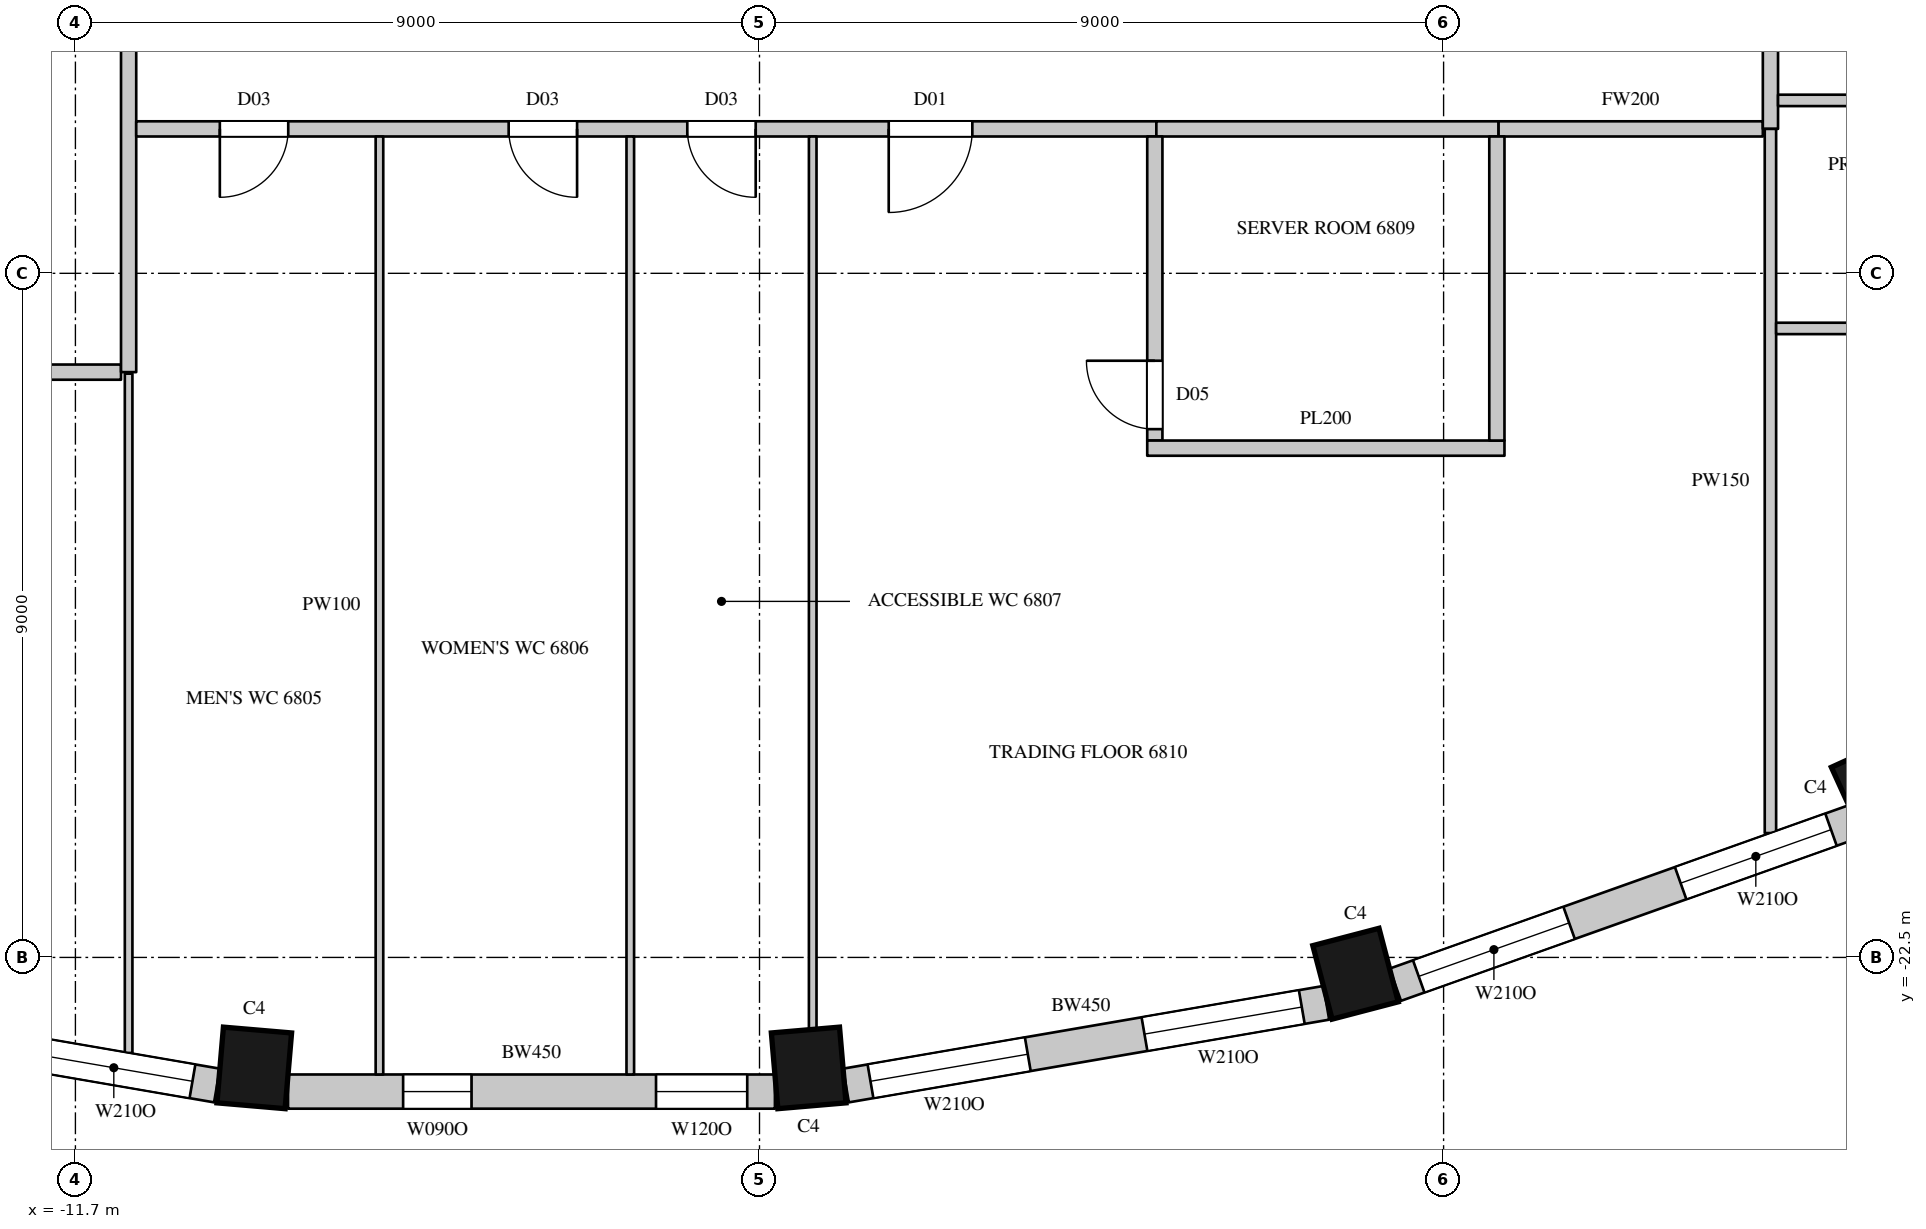
"""IFC4 building model, lengths in metres.
Left out: names, types, materials, properties, quantities, classifications, styles, units other than length and angle.
Written with IfcOpenShell. Run it as: python <this file> out.ifc"""

import sys

from ifc_helpers import new_model, si_unit, direction, frame, frame_2d, origin, origin_2d, place, context, subcontext, project, spatial, rectangle, extrude, element, fill, save


model = new_model("IFC4")
c1 = context("Model", 3, precision=1e-05, world=origin(), true_north=direction((0.0, 1.0)))
c2 = subcontext(c1, "Body", "Model", "MODEL_VIEW")
j1 = project(units=[si_unit("LENGTHUNIT", "METRE"), si_unit("PLANEANGLEUNIT", "RADIAN")], contexts=[c1])
p1 = place(None, origin())
s1 = spatial("IfcSite", under=j1, at=p1, CompositionType="ELEMENT")
p2 = place(p1, origin())
s2 = spatial("IfcBuilding", under=s1, at=p2, CompositionType="ELEMENT")
p3 = place(p2, frame((0.0, 0.0, 300.8)))
s3 = spatial("IfcBuildingStorey", under=s2, at=p3, CompositionType="ELEMENT", Elevation=300.8)
for number, where, z_axis, x_axis in (
    (1, (-9.347, -23.954, 0.0), (0.0, 0.0, 1.0), (0.996, -0.085, 0.0)),
    (2, (-2.053, -23.954, 0.0), (0.0, 0.0, 1.0), (0.996, 0.085, 0.0)),
    (3, (5.142, -22.715, 0.0), (0.0, 0.0, 1.0), (0.967, 0.253, 0.0)),
    (4, (12.019, -20.267, 0.0), (0.0, 0.0, 1.0), (0.91, 0.415, 0.0)),
):
    element("IfcColumn", number, at=place(p3, frame(where, z_axis=z_axis, x_axis=x_axis)), inside=s3, PredefinedType="COLUMN", context=c2, shape_type="SweptSolid", body=[
        extrude(rectangle(XDim=0.9, YDim=1.0, at=origin_2d()), origin(), (0.0, 0.0, 1.0), 4.1),
    ])
p4 = place(p3, frame((-16.157, -23.097, 0.0), z_axis=(0.0, 0.0, 1.0), x_axis=(0.985502073964, -0.169663379113, 0.0)))
e5 = element("IfcWall", 5, at=p4, inside=s3, PredefinedType="SOLIDWALL", context=c2, shape_type="SweptSolid", body=[
    extrude(rectangle(XDim=6.412, YDim=0.45, at=frame_2d((3.206, 0.0))), origin(), (0.0, 0.0, 1.0), 3.8),
])
p5 = place(p4, frame((0.327, 0.0, 1.05)))
e6 = element("IfcOpeningElement", 6, at=p5, cuts=e5, PredefinedType="OPENING", context=c2, shape_type="SweptSolid", body=[
    extrude(rectangle(XDim=2.1, YDim=2.4, at=frame_2d((1.05, 1.2))), frame((0.0, 0.235, 0.0), z_axis=(0.0, -1.0, 0.0), x_axis=(1.0, 0.0, 0.0)), (0.0, 0.0, 1.0), 0.47),
])
p6 = place(p4, frame((3.985, 0.0, 1.05)))
e7 = element("IfcOpeningElement", 7, at=p6, cuts=e5, PredefinedType="OPENING", context=c2, shape_type="SweptSolid", body=[
    extrude(rectangle(XDim=2.1, YDim=2.4, at=frame_2d((1.05, 1.2))), frame((0.0, 0.235, 0.0), z_axis=(0.0, -1.0, 0.0), x_axis=(1.0, 0.0, 0.0)), (0.0, 0.0, 1.0), 0.47),
])
p7 = place(p3, frame((-8.903, -24.265, 0.0), z_axis=(0.0, 0.0, 1.0), x_axis=(1.0, 0.0, 0.0)))
e8 = element("IfcWall", 8, at=p7, inside=s3, PredefinedType="SOLIDWALL", context=c2, shape_type="SweptSolid", body=[
    extrude(rectangle(XDim=6.406, YDim=0.45, at=frame_2d((3.203, 0.0))), origin(), (0.0, 0.0, 1.0), 3.8),
])
p8 = place(p7, frame((1.514, 0.0, 1.05)))
e9 = element("IfcOpeningElement", 9, at=p8, cuts=e8, PredefinedType="OPENING", context=c2, shape_type="SweptSolid", body=[
    extrude(rectangle(XDim=0.9, YDim=2.4, at=frame_2d((0.45, 1.2))), frame((0.0, 0.235, 0.0), z_axis=(0.0, -1.0, 0.0), x_axis=(1.0, 0.0, 0.0)), (0.0, 0.0, 1.0), 0.47),
])
p9 = place(p7, frame((4.841, 0.0, 1.05)))
e10 = element("IfcOpeningElement", 10, at=p9, cuts=e8, PredefinedType="OPENING", context=c2, shape_type="SweptSolid", body=[
    extrude(rectangle(XDim=1.2, YDim=2.4, at=frame_2d((0.6, 1.2))), frame((0.0, 0.235, 0.0), z_axis=(0.0, -1.0, 0.0), x_axis=(1.0, 0.0, 0.0)), (0.0, 0.0, 1.0), 0.47),
])
p10 = place(p3, frame((-1.562, -24.185, 0.0), z_axis=(0.0, 0.0, 1.0), x_axis=(0.985502073964, 0.169663379113, 0.0)))
e11 = element("IfcWall", 11, at=p10, inside=s3, PredefinedType="SOLIDWALL", context=c2, shape_type="SweptSolid", body=[
    extrude(rectangle(XDim=6.412, YDim=0.45, at=frame_2d((3.206, 0.0))), origin(), (0.0, 0.0, 1.0), 3.8),
])
p11 = place(p10, frame((0.327, 0.0, 1.05)))
e12 = element("IfcOpeningElement", 12, at=p11, cuts=e11, PredefinedType="OPENING", context=c2, shape_type="SweptSolid", body=[
    extrude(rectangle(XDim=2.1, YDim=2.4, at=frame_2d((1.05, 1.2))), frame((0.0, 0.235, 0.0), z_axis=(0.0, -1.0, 0.0), x_axis=(1.0, 0.0, 0.0)), (0.0, 0.0, 1.0), 0.47),
])
p12 = place(p10, frame((3.985, 0.0, 1.05)))
e13 = element("IfcOpeningElement", 13, at=p12, cuts=e11, PredefinedType="OPENING", context=c2, shape_type="SweptSolid", body=[
    extrude(rectangle(XDim=2.1, YDim=2.4, at=frame_2d((1.05, 1.2))), frame((0.0, 0.235, 0.0), z_axis=(0.0, -1.0, 0.0), x_axis=(1.0, 0.0, 0.0)), (0.0, 0.0, 1.0), 0.47),
])
p13 = place(p3, frame((5.665, -22.859, 0.0), z_axis=(0.0, 0.0, 1.0), x_axis=(0.942108340262, 0.335308626803, 0.0)))
e14 = element("IfcWall", 14, at=p13, inside=s3, PredefinedType="SOLIDWALL", context=c2, shape_type="SweptSolid", body=[
    extrude(rectangle(XDim=6.412, YDim=0.45, at=frame_2d((3.206, 0.0))), origin(), (0.0, 0.0, 1.0), 3.8),
])
p14 = place(p13, frame((0.327, 0.0, 1.05)))
e15 = element("IfcOpeningElement", 15, at=p14, cuts=e14, PredefinedType="OPENING", context=c2, shape_type="SweptSolid", body=[
    extrude(rectangle(XDim=2.1, YDim=2.4, at=frame_2d((1.05, 1.2))), frame((0.0, 0.235, 0.0), z_axis=(0.0, -1.0, 0.0), x_axis=(1.0, 0.0, 0.0)), (0.0, 0.0, 1.0), 0.47),
])
p15 = place(p13, frame((3.985, 0.0, 1.05)))
e16 = element("IfcOpeningElement", 16, at=p15, cuts=e14, PredefinedType="OPENING", context=c2, shape_type="SweptSolid", body=[
    extrude(rectangle(XDim=2.1, YDim=2.4, at=frame_2d((1.05, 1.2))), frame((0.0, 0.235, 0.0), z_axis=(0.0, -1.0, 0.0), x_axis=(1.0, 0.0, 0.0)), (0.0, 0.0, 1.0), 0.47),
])
p16 = place(p3, frame((-13.97, -14.8, 0.0), z_axis=(0.0, 0.0, 1.0), x_axis=(1.0, 0.0, 0.0)))
e17 = element("IfcWall", 17, at=p16, inside=s3, PredefinedType="PARTITIONING", context=c2, shape_type="SweptSolid", body=[
    extrude(rectangle(XDim=2.87, YDim=0.2, at=frame_2d((1.435, 0.0))), origin(), (0.0, 0.0, 1.0), 3.8),
])
p17 = place(p3, frame((-11.0, -14.8, 0.0), z_axis=(0.0, 0.0, 1.0), x_axis=(0.0, 1.0, 0.0)))
e18 = element("IfcWall", 18, at=p17, inside=s3, PredefinedType="PARTITIONING", context=c2, shape_type="SweptSolid", body=[
    extrude(rectangle(XDim=29.5, YDim=0.2, at=frame_2d((14.75, 0.0))), origin(), (0.0, 0.0, 1.0), 3.8),
])
p18 = place(p17, frame((10.5, 0.0, 0.0)))
e19 = element("IfcOpeningElement", 19, at=p18, cuts=e18, PredefinedType="OPENING", context=c2, shape_type="SweptSolid", body=[
    extrude(rectangle(XDim=1.5, YDim=2.4, at=frame_2d((0.75, 1.2))), frame((0.0, 0.11, 0.0), z_axis=(0.0, -1.0, 0.0), x_axis=(1.0, 0.0, 0.0)), (0.0, 0.0, 1.0), 0.22),
])
p19 = place(p3, frame((-10.9, -11.6, 0.0), z_axis=(0.0, 0.0, 1.0), x_axis=(1.0, 0.0, 0.0)))
e20 = element("IfcWall", 20, at=p19, inside=s3, PredefinedType="PARTITIONING", context=c2, shape_type="SweptSolid", body=[
    extrude(rectangle(XDim=13.421, YDim=0.2, at=frame_2d((6.71, 0.0))), origin(), (0.0, 0.0, 1.0), 3.8),
])
p20 = place(p19, frame((1.1, 0.0, 0.0)))
e21 = element("IfcOpeningElement", 21, at=p20, cuts=e20, PredefinedType="OPENING", context=c2, shape_type="SweptSolid", body=[
    extrude(rectangle(XDim=0.9, YDim=2.2, at=frame_2d((0.45, 1.1))), frame((0.0, 0.11, 0.0), z_axis=(0.0, -1.0, 0.0), x_axis=(1.0, 0.0, 0.0)), (0.0, 0.0, 1.0), 0.22),
])
p21 = place(p19, frame((4.9, 0.0, 0.0)))
e22 = element("IfcOpeningElement", 22, at=p21, cuts=e20, PredefinedType="OPENING", context=c2, shape_type="SweptSolid", body=[
    extrude(rectangle(XDim=0.9, YDim=2.2, at=frame_2d((0.45, 1.1))), frame((0.0, 0.11, 0.0), z_axis=(0.0, -1.0, 0.0), x_axis=(1.0, 0.0, 0.0)), (0.0, 0.0, 1.0), 0.22),
])
p22 = place(p19, frame((7.25, 0.0, 0.0)))
e23 = element("IfcOpeningElement", 23, at=p22, cuts=e20, PredefinedType="OPENING", context=c2, shape_type="SweptSolid", body=[
    extrude(rectangle(XDim=0.9, YDim=2.2, at=frame_2d((0.45, 1.1))), frame((0.0, 0.11, 0.0), z_axis=(0.0, -1.0, 0.0), x_axis=(1.0, 0.0, 0.0)), (0.0, 0.0, 1.0), 0.22),
])
p23 = place(p19, frame((9.9, 0.0, 0.0)))
e24 = element("IfcOpeningElement", 24, at=p23, cuts=e20, PredefinedType="OPENING", context=c2, shape_type="SweptSolid", body=[
    extrude(rectangle(XDim=1.1, YDim=2.4, at=frame_2d((0.55, 1.2))), frame((0.0, 0.11, 0.0), z_axis=(0.0, -1.0, 0.0), x_axis=(1.0, 0.0, 0.0)), (0.0, 0.0, 1.0), 0.22),
])
p24 = place(p3, frame((7.021, -11.6, 0.0), z_axis=(0.0, 0.0, 1.0), x_axis=(1.0, 0.0, 0.0)))
e25 = element("IfcWall", 25, at=p24, inside=s3, PredefinedType="PARTITIONING", context=c2, shape_type="SweptSolid", body=[
    extrude(rectangle(XDim=3.479, YDim=0.2, at=frame_2d((1.74, 0.0))), origin(), (0.0, 0.0, 1.0), 3.8),
])
p25 = place(p3, frame((10.6, -11.6, 0.0), z_axis=(0.0, 0.0, 1.0), x_axis=(0.0, 1.0, 0.0)))
e26 = element("IfcWall", 26, at=p25, inside=s3, PredefinedType="PARTITIONING", context=c2, shape_type="SweptSolid", body=[
    extrude(rectangle(XDim=23.7, YDim=0.2, at=frame_2d((11.85, 0.0))), origin(), (0.0, 0.0, 1.0), 3.8),
])
p26 = place(p25, frame((9.45, 0.0, 0.0)))
e27 = element("IfcOpeningElement", 27, at=p26, cuts=e26, PredefinedType="OPENING", context=c2, shape_type="SweptSolid", body=[
    extrude(rectangle(XDim=1.5, YDim=2.4, at=frame_2d((0.75, 1.2))), frame((0.0, 0.11, 0.0), z_axis=(0.0, -1.0, 0.0), x_axis=(1.0, 0.0, 0.0)), (0.0, 0.0, 1.0), 0.22),
])
p27 = place(p25, frame((19.45, 0.0, 0.0)))
e28 = element("IfcOpeningElement", 28, at=p27, cuts=e26, PredefinedType="OPENING", context=c2, shape_type="SweptSolid", body=[
    extrude(rectangle(XDim=1.1, YDim=2.4, at=frame_2d((0.55, 1.2))), frame((0.0, 0.11, 0.0), z_axis=(0.0, -1.0, 0.0), x_axis=(1.0, 0.0, 0.0)), (0.0, 0.0, 1.0), 0.22),
])
p28 = place(p25, frame((4.6, 0.0, 0.0)))
e29 = element("IfcOpeningElement", 29, at=p28, cuts=e26, PredefinedType="OPENING", context=c2, shape_type="SweptSolid", body=[
    extrude(rectangle(XDim=1.1, YDim=2.4, at=frame_2d((0.55, 1.2))), frame((0.0, 0.11, 0.0), z_axis=(0.0, -1.0, 0.0), x_axis=(1.0, 0.0, 0.0)), (0.0, 0.0, 1.0), 0.22),
])
p29 = place(p3, frame((10.6, -20.864, 0.0), z_axis=(0.0, 0.0, 1.0), x_axis=(0.0, 1.0, 0.0)))
e30 = element("IfcWall", 30, at=p29, inside=s3, PredefinedType="PARTITIONING", context=c2, shape_type="SweptSolid", body=[
    extrude(rectangle(XDim=9.264, YDim=0.15, at=frame_2d((4.632, 0.0))), origin(), (0.0, 0.0, 1.0), 3.8),
])
p30 = place(p3, frame((10.675, -14.225, 0.0), z_axis=(0.0, 0.0, 1.0), x_axis=(1.0, 0.0, 0.0)))
e31 = element("IfcWall", 31, at=p30, inside=s3, PredefinedType="PARTITIONING", context=c2, shape_type="SweptSolid", body=[
    extrude(rectangle(XDim=3.6, YDim=0.15, at=frame_2d((1.8, 0.0))), origin(), (0.0, 0.0, 1.0), 3.8),
])
p31 = place(p30, frame((1.3, 0.0, 0.0)))
e32 = element("IfcOpeningElement", 32, at=p31, cuts=e31, PredefinedType="OPENING", context=c2, shape_type="SweptSolid", body=[
    extrude(rectangle(XDim=0.9, YDim=2.2, at=frame_2d((0.45, 1.1))), frame((0.0, 0.085, 0.0), z_axis=(0.0, -1.0, 0.0), x_axis=(1.0, 0.0, 0.0)), (0.0, 0.0, 1.0), 0.17),
])
p32 = place(p3, frame((10.7, -11.225, 0.0), z_axis=(0.0, 0.0, 1.0), x_axis=(1.0, 0.0, 0.0)))
e33 = element("IfcWall", 33, at=p32, inside=s3, PredefinedType="PARTITIONING", context=c2, shape_type="SweptSolid", body=[
    extrude(rectangle(XDim=3.425, YDim=0.15, at=frame_2d((1.712, 0.0))), origin(), (0.0, 0.0, 1.0), 3.8),
])
p33 = place(p3, frame((2.521, -11.6, 0.0), z_axis=(0.0, 0.0, 1.0), x_axis=(1.0, 0.0, 0.0)))
e34 = element("IfcWall", 34, at=p33, inside=s3, PredefinedType="PARTITIONING", context=c2, shape_type="SweptSolid", body=[
    extrude(rectangle(XDim=4.5, YDim=0.2, at=frame_2d((2.25, 0.0))), origin(), (0.0, 0.0, 1.0), 3.8),
])
p34 = place(p3, frame((2.501, -15.7, 0.0), z_axis=(0.0, 0.0, 1.0), x_axis=(0.0, 1.0, 0.0)))
e35 = element("IfcWall", 35, at=p34, inside=s3, PredefinedType="PARTITIONING", context=c2, shape_type="SweptSolid", body=[
    extrude(rectangle(XDim=4.0, YDim=0.2, at=frame_2d((2.0, 0.0))), origin(), (0.0, 0.0, 1.0), 3.8),
])
p35 = place(p34, frame((0.15, 0.0, 0.0)))
e36 = element("IfcOpeningElement", 36, at=p35, cuts=e35, PredefinedType="OPENING", context=c2, shape_type="SweptSolid", body=[
    extrude(rectangle(XDim=0.9, YDim=2.2, at=frame_2d((0.45, 1.1))), frame((0.0, 0.11, 0.0), z_axis=(0.0, -1.0, 0.0), x_axis=(1.0, 0.0, 0.0)), (0.0, 0.0, 1.0), 0.22),
])
p36 = place(p3, frame((2.401, -15.8, 0.0), z_axis=(0.0, 0.0, 1.0), x_axis=(1.0, 0.0, 0.0)))
e37 = element("IfcWall", 37, at=p36, inside=s3, PredefinedType="PARTITIONING", context=c2, shape_type="SweptSolid", body=[
    extrude(rectangle(XDim=4.7, YDim=0.2, at=frame_2d((2.35, 0.0))), origin(), (0.0, 0.0, 1.0), 3.8),
])
p37 = place(p3, frame((7.001, -15.7, 0.0), z_axis=(0.0, 0.0, 1.0), x_axis=(0.0, 1.0, 0.0)))
e38 = element("IfcWall", 38, at=p37, inside=s3, PredefinedType="PARTITIONING", context=c2, shape_type="SweptSolid", body=[
    extrude(rectangle(XDim=4.0, YDim=0.2, at=frame_2d((2.0, 0.0))), origin(), (0.0, 0.0, 1.0), 3.8),
])
p38 = place(p3, frame((-11.0, -23.757, 0.0), z_axis=(0.0, 0.0, 1.0), x_axis=(0.0, 1.0, 0.0)))
e39 = element("IfcWall", 39, at=p38, inside=s3, PredefinedType="PARTITIONING", context=c2, shape_type="SweptSolid", body=[
    extrude(rectangle(XDim=8.937, YDim=0.1, at=frame_2d((4.468, 0.0))), origin(), (0.0, 0.0, 1.0), 3.8),
])
for number, where, z_axis, x_axis in (
    (40, (-7.7, -24.04, 0.0), (0.0, 0.0, 1.0), (0.0, 1.0, 0.0)),
    (41, (-4.4, -24.04, 0.0), (0.0, 0.0, 1.0), (0.0, 1.0, 0.0)),
):
    element("IfcWall", number, at=place(p3, frame(where, z_axis=z_axis, x_axis=x_axis)), inside=s3, PredefinedType="PARTITIONING", context=c2, shape_type="SweptSolid", body=[
        extrude(rectangle(XDim=12.34, YDim=0.1, at=frame_2d((6.17, 0.0))), origin(), (0.0, 0.0, 1.0), 3.8),
    ])
p39 = place(p3, frame((-2.0, -23.447, 0.0), z_axis=(0.0, 0.0, 1.0), x_axis=(0.0, 1.0, 0.0)))
e42 = element("IfcWall", 42, at=p39, inside=s3, PredefinedType="PARTITIONING", context=c2, shape_type="SweptSolid", body=[
    extrude(rectangle(XDim=11.747, YDim=0.1, at=frame_2d((5.874, 0.0))), origin(), (0.0, 0.0, 1.0), 3.8),
])
p40 = place(p6, origin())
e43 = element("IfcWindow", 43, at=p40, inside=s3, PartitioningType="SINGLE_PANEL", PredefinedType="WINDOW", context=c2, shape_type="SweptSolid", body=[
    extrude(rectangle(XDim=2.1, YDim=2.4, at=frame_2d((1.05, 1.2))), frame((0.0, 0.135, 0.0), z_axis=(0.0, -1.0, 0.0), x_axis=(1.0, 0.0, 0.0)), (0.0, 0.0, 1.0), 0.06),
])
fill(e7, e43)
p41 = place(p11, origin())
e44 = element("IfcWindow", 44, at=p41, inside=s3, PartitioningType="SINGLE_PANEL", PredefinedType="WINDOW", context=c2, shape_type="SweptSolid", body=[
    extrude(rectangle(XDim=2.1, YDim=2.4, at=frame_2d((1.05, 1.2))), frame((0.0, 0.135, 0.0), z_axis=(0.0, -1.0, 0.0), x_axis=(1.0, 0.0, 0.0)), (0.0, 0.0, 1.0), 0.06),
])
fill(e12, e44)
p42 = place(p12, origin())
e45 = element("IfcWindow", 45, at=p42, inside=s3, PartitioningType="SINGLE_PANEL", PredefinedType="WINDOW", context=c2, shape_type="SweptSolid", body=[
    extrude(rectangle(XDim=2.1, YDim=2.4, at=frame_2d((1.05, 1.2))), frame((0.0, 0.135, 0.0), z_axis=(0.0, -1.0, 0.0), x_axis=(1.0, 0.0, 0.0)), (0.0, 0.0, 1.0), 0.06),
])
fill(e13, e45)
p43 = place(p14, origin())
e46 = element("IfcWindow", 46, at=p43, inside=s3, PartitioningType="SINGLE_PANEL", PredefinedType="WINDOW", context=c2, shape_type="SweptSolid", body=[
    extrude(rectangle(XDim=2.1, YDim=2.4, at=frame_2d((1.05, 1.2))), frame((0.0, 0.135, 0.0), z_axis=(0.0, -1.0, 0.0), x_axis=(1.0, 0.0, 0.0)), (0.0, 0.0, 1.0), 0.06),
])
fill(e15, e46)
p44 = place(p15, origin())
e47 = element("IfcWindow", 47, at=p44, inside=s3, PartitioningType="SINGLE_PANEL", PredefinedType="WINDOW", context=c2, shape_type="SweptSolid", body=[
    extrude(rectangle(XDim=2.1, YDim=2.4, at=frame_2d((1.05, 1.2))), frame((0.0, 0.135, 0.0), z_axis=(0.0, -1.0, 0.0), x_axis=(1.0, 0.0, 0.0)), (0.0, 0.0, 1.0), 0.06),
])
fill(e16, e47)
p45 = place(p20, origin())
e48 = element("IfcDoor", 48, at=p45, inside=s3, OperationType="SINGLE_SWING_RIGHT", PredefinedType="DOOR", context=c2, shape_type="SweptSolid", body=[
    extrude(rectangle(XDim=0.9, YDim=2.2, at=frame_2d((0.45, 1.1))), frame((0.0, 0.025, 0.0), z_axis=(0.0, -1.0, 0.0), x_axis=(1.0, 0.0, 0.0)), (0.0, 0.0, 1.0), 0.05),
])
fill(e21, e48)
p46 = place(p21, origin())
e49 = element("IfcDoor", 49, at=p46, inside=s3, OperationType="SINGLE_SWING_LEFT", PredefinedType="DOOR", context=c2, shape_type="SweptSolid", body=[
    extrude(rectangle(XDim=0.9, YDim=2.2, at=frame_2d((0.45, 1.1))), frame((0.0, 0.025, 0.0), z_axis=(0.0, -1.0, 0.0), x_axis=(1.0, 0.0, 0.0)), (0.0, 0.0, 1.0), 0.05),
])
fill(e22, e49)
p47 = place(p22, origin())
e50 = element("IfcDoor", 50, at=p47, inside=s3, OperationType="SINGLE_SWING_LEFT", PredefinedType="DOOR", context=c2, shape_type="SweptSolid", body=[
    extrude(rectangle(XDim=0.9, YDim=2.2, at=frame_2d((0.45, 1.1))), frame((0.0, 0.025, 0.0), z_axis=(0.0, -1.0, 0.0), x_axis=(1.0, 0.0, 0.0)), (0.0, 0.0, 1.0), 0.05),
])
fill(e23, e50)
p48 = place(p23, origin())
e51 = element("IfcDoor", 51, at=p48, inside=s3, OperationType="SINGLE_SWING_RIGHT", PredefinedType="DOOR", context=c2, shape_type="SweptSolid", body=[
    extrude(rectangle(XDim=1.1, YDim=2.4, at=frame_2d((0.55, 1.2))), frame((0.0, 0.025, 0.0), z_axis=(0.0, -1.0, 0.0), x_axis=(1.0, 0.0, 0.0)), (0.0, 0.0, 1.0), 0.05),
])
fill(e24, e51)
p49 = place(p35, origin())
e52 = element("IfcDoor", 52, at=p49, inside=s3, OperationType="SINGLE_SWING_RIGHT", PredefinedType="DOOR", context=c2, shape_type="SweptSolid", body=[
    extrude(rectangle(XDim=0.9, YDim=2.2, at=frame_2d((0.45, 1.1))), frame((0.0, 0.025, 0.0), z_axis=(0.0, -1.0, 0.0), x_axis=(1.0, 0.0, 0.0)), (0.0, 0.0, 1.0), 0.05),
])
fill(e36, e52)
p50 = place(p8, origin())
e53 = element("IfcWindow", 53, at=p50, inside=s3, PartitioningType="SINGLE_PANEL", PredefinedType="WINDOW", context=c2, shape_type="SweptSolid", body=[
    extrude(rectangle(XDim=0.9, YDim=2.4, at=frame_2d((0.45, 1.2))), frame((0.0, 0.135, 0.0), z_axis=(0.0, -1.0, 0.0), x_axis=(1.0, 0.0, 0.0)), (0.0, 0.0, 1.0), 0.06),
])
fill(e9, e53)
p51 = place(p9, origin())
e54 = element("IfcWindow", 54, at=p51, inside=s3, PartitioningType="SINGLE_PANEL", PredefinedType="WINDOW", context=c2, shape_type="SweptSolid", body=[
    extrude(rectangle(XDim=1.2, YDim=2.4, at=frame_2d((0.6, 1.2))), frame((0.0, 0.135, 0.0), z_axis=(0.0, -1.0, 0.0), x_axis=(1.0, 0.0, 0.0)), (0.0, 0.0, 1.0), 0.06),
])
fill(e10, e54)
save(model, sys.argv[1])
